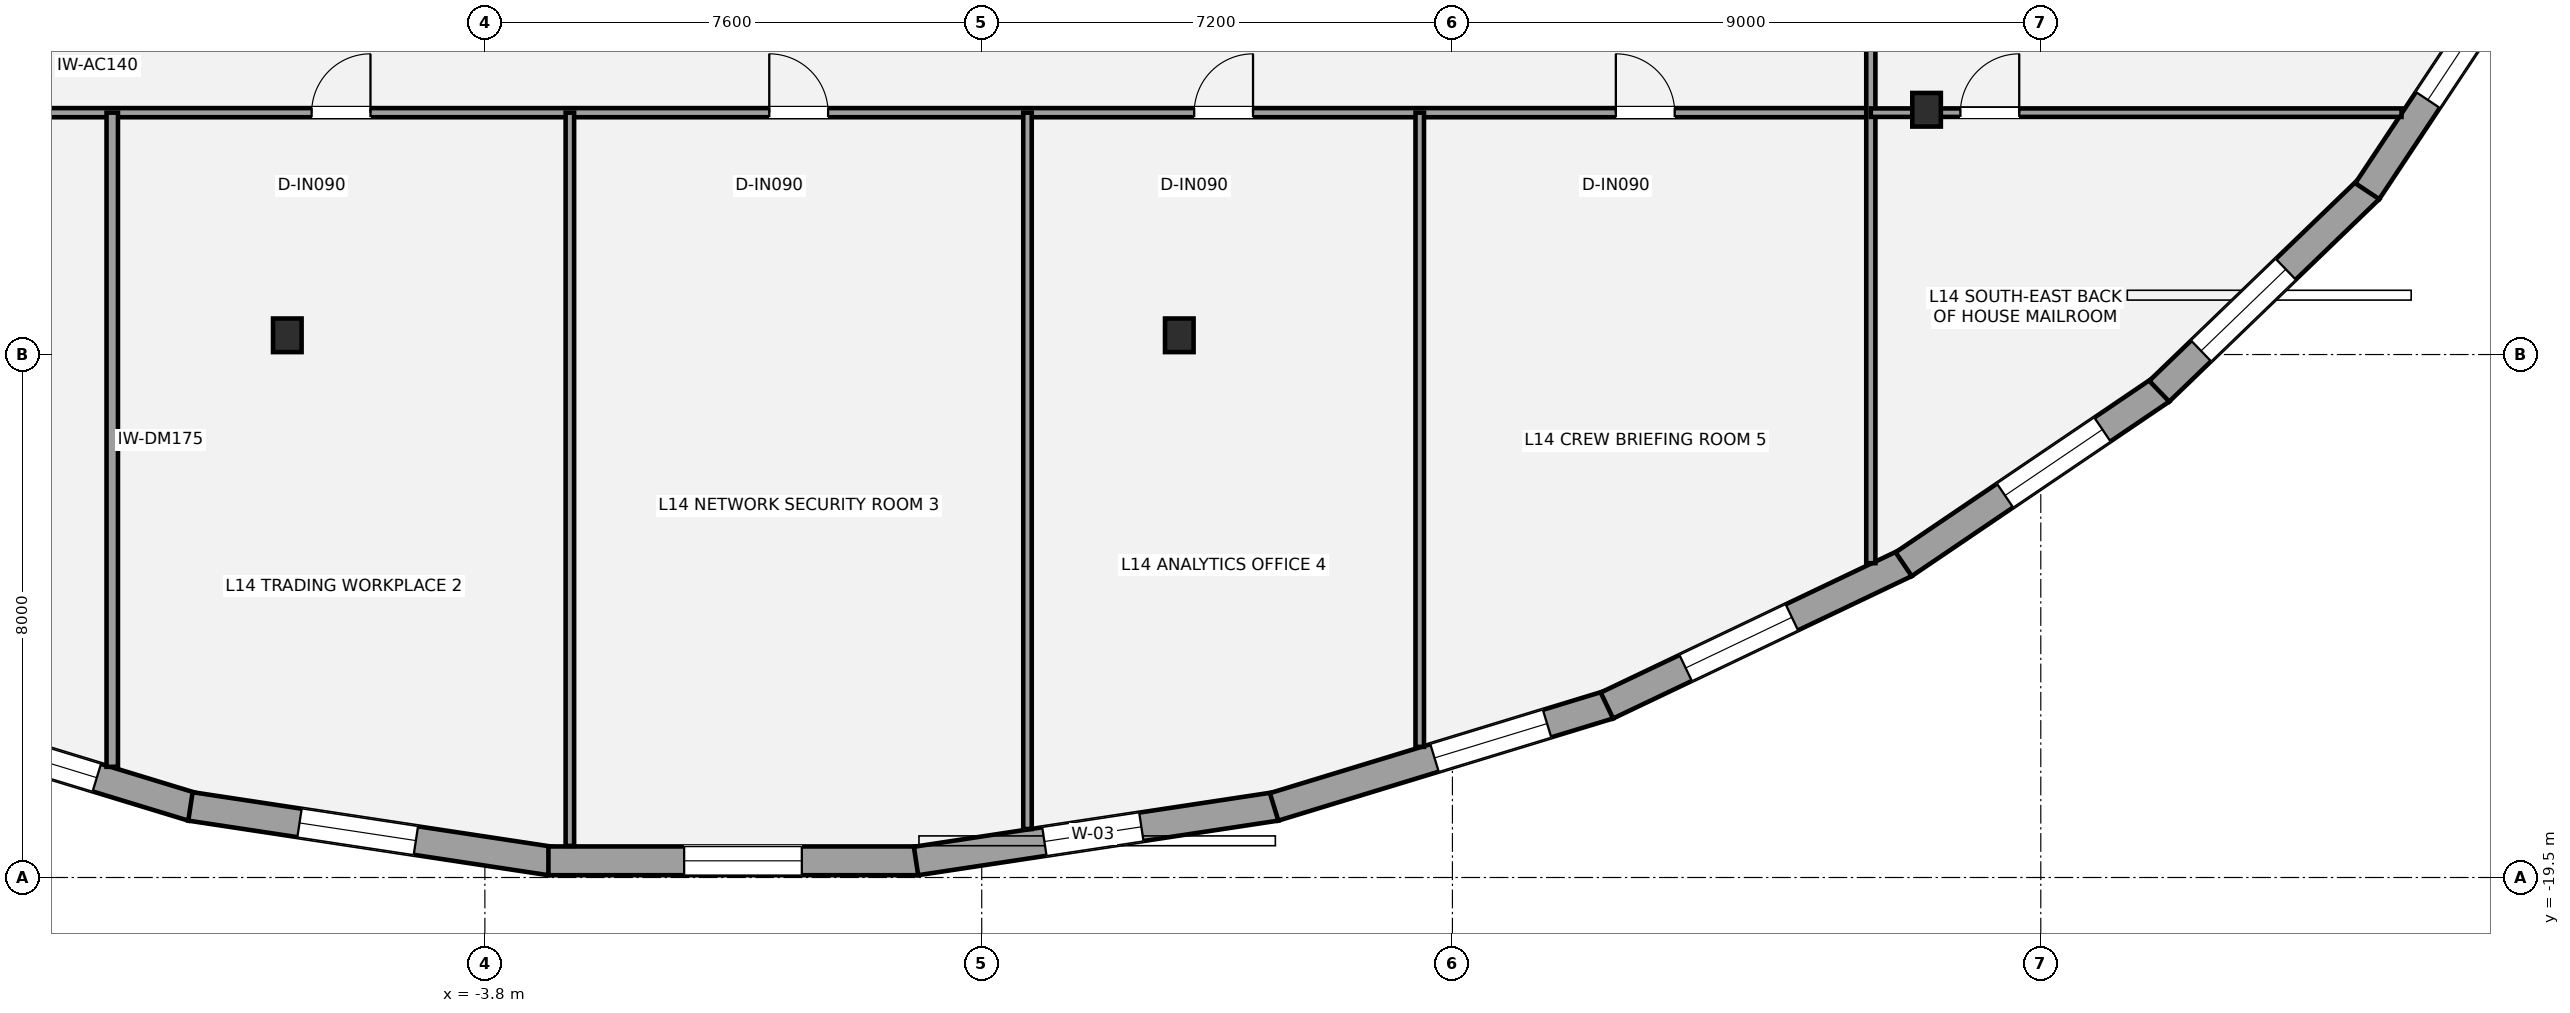
"""IFC4 building model, lengths in metres.
Left out: names, types, materials, properties, quantities, classifications, styles, units other than length and angle.
Written with IfcOpenShell. Run it as: python <this file> out.ifc"""

import sys

from ifc_helpers import new_model, si_unit, direction, frame, frame_2d, origin, origin_2d, place, context, subcontext, project, spatial, rectangle, i_section, extrude, element, fill, save


model = new_model("IFC4")
c1 = context("Model", 3, precision=1e-05, world=origin(), true_north=direction((0.0, 1.0)))
c2 = subcontext(c1, "Body", "Model", "MODEL_VIEW")
j1 = project(units=[si_unit("LENGTHUNIT", "METRE"), si_unit("PLANEANGLEUNIT", "RADIAN")], contexts=[c1])
p1 = place(None, origin())
s1 = spatial("IfcSite", under=j1, at=p1, CompositionType="ELEMENT")
p2 = place(p1, origin())
s2 = spatial("IfcBuilding", under=s1, at=p2, CompositionType="ELEMENT")
p3 = place(p2, frame((0.0, 0.0, 55.8)))
s3 = spatial("IfcBuildingStorey", under=s2, at=p3, CompositionType="ELEMENT", Elevation=55.8)
for number, where, z_axis, x_axis in (
    (1, (-6.822, -11.206, 0.0), (0.0, 0.0, 1.0), (1.0, 0.0, 0.0)),
    (2, (6.822, -11.206, 0.0), (0.0, 0.0, 1.0), (1.0, 0.0, 0.0)),
    (3, (18.253, -7.756, 0.0), (0.0, 0.0, 1.0), (1.0, 0.0, 0.0)),
):
    element("IfcColumn", number, at=place(p3, frame(where, z_axis=z_axis, x_axis=x_axis)), inside=s3, PredefinedType="COLUMN", context=c2, shape_type="SweptSolid", body=[
        extrude(i_section(OverallWidth=0.437, OverallDepth=0.514, WebThickness=0.061, FlangeThickness=0.097, at=origin_2d()), origin(), (0.0, 0.0, 1.0), 3.6),
    ])
p4 = place(p3, frame((-8.272, -18.42, 0.0), z_axis=(0.0, 0.0, 1.0), x_axis=(-0.956466543593, 0.291841996615, 0.0)))
e4 = element("IfcWall", 4, at=p4, inside=s3, PredefinedType="STANDARD", context=c2, shape_type="SweptSolid", body=[
    extrude(rectangle(XDim=5.354, YDim=0.44, at=frame_2d((2.677, 0.0))), origin(), (0.0, 0.0, 1.0), 2.529),
])
p5 = place(p4, frame((1.531, 0.0, 0.65)))
e5 = element("IfcOpeningElement", 5, at=p5, cuts=e4, PredefinedType="OPENING", context=c2, shape_type="SweptSolid", body=[
    extrude(rectangle(XDim=1.8, YDim=1.7, at=frame_2d((0.9, 0.85))), frame((0.0, 0.23, 0.0), z_axis=(0.0, -1.0, 0.0), x_axis=(1.0, 0.0, 0.0)), (0.0, 0.0, 1.0), 0.46),
])
p6 = place(p3, frame((-2.795, -19.247, 0.0), z_axis=(0.0, 0.0, 1.0), x_axis=(-0.988714127489, 0.149814465604, 0.0)))
e6 = element("IfcWall", 6, at=p6, inside=s3, PredefinedType="STANDARD", context=c2, shape_type="SweptSolid", body=[
    extrude(rectangle(XDim=5.572, YDim=0.44, at=frame_2d((2.786, 0.0))), origin(), (0.0, 0.0, 1.0), 2.529),
])
p7 = place(p6, frame((2.084, 0.0, 0.65)))
e7 = element("IfcOpeningElement", 7, at=p7, cuts=e6, PredefinedType="OPENING", context=c2, shape_type="SweptSolid", body=[
    extrude(rectangle(XDim=1.8, YDim=1.7, at=frame_2d((0.9, 0.85))), frame((0.0, 0.23, 0.0), z_axis=(0.0, -1.0, 0.0), x_axis=(1.0, 0.0, 0.0)), (0.0, 0.0, 1.0), 0.46),
])
p8 = place(p3, frame((2.828, -19.245, 0.0), z_axis=(0.0, 0.0, 1.0), x_axis=(-1.0, 0.0, 0.0)))
e8 = element("IfcWall", 8, at=p8, inside=s3, PredefinedType="STANDARD", context=c2, shape_type="SweptSolid", body=[
    extrude(rectangle(XDim=5.656, YDim=0.44, at=frame_2d((2.828, 0.0))), origin(), (0.0, 0.0, 1.0), 2.533),
])
p9 = place(p8, frame((1.78, 0.0, 0.65)))
e9 = element("IfcOpeningElement", 9, at=p9, cuts=e8, PredefinedType="OPENING", context=c2, shape_type="SweptSolid", body=[
    extrude(rectangle(XDim=1.8, YDim=1.7, at=frame_2d((0.9, 0.85))), frame((0.0, 0.23, 0.0), z_axis=(0.0, -1.0, 0.0), x_axis=(1.0, 0.0, 0.0)), (0.0, 0.0, 1.0), 0.46),
])
p10 = place(p3, frame((8.304, -18.413, 0.0), z_axis=(0.0, 0.0, 1.0), x_axis=(-0.988714127489, -0.149814465604, 0.0)))
e10 = element("IfcWall", 10, at=p10, inside=s3, PredefinedType="STANDARD", context=c2, shape_type="SweptSolid", body=[
    extrude(rectangle(XDim=5.572, YDim=0.44, at=frame_2d((2.786, 0.0))), origin(), (0.0, 0.0, 1.0), 2.529),
])
p11 = place(p10, frame((2.085, 0.0, 0.65)))
e11 = element("IfcOpeningElement", 11, at=p11, cuts=e10, PredefinedType="OPENING", context=c2, shape_type="SweptSolid", body=[
    extrude(rectangle(XDim=1.5, YDim=1.7, at=frame_2d((0.75, 0.85))), frame((0.0, 0.23, 0.0), z_axis=(0.0, -1.0, 0.0), x_axis=(1.0, 0.0, 0.0)), (0.0, 0.0, 1.0), 0.46),
])
p12 = place(p3, frame((13.393, -16.857, 0.0), z_axis=(0.0, 0.0, 1.0), x_axis=(-0.956466543593, -0.291841996615, 0.0)))
e12 = element("IfcWall", 12, at=p12, inside=s3, PredefinedType="STANDARD", context=c2, shape_type="SweptSolid", body=[
    extrude(rectangle(XDim=5.354, YDim=0.44, at=frame_2d((2.677, 0.0))), origin(), (0.0, 0.0, 1.0), 2.529),
])
p13 = place(p12, frame((0.989, 0.0, 0.65)))
e13 = element("IfcOpeningElement", 13, at=p13, cuts=e12, PredefinedType="OPENING", context=c2, shape_type="SweptSolid", body=[
    extrude(rectangle(XDim=1.8, YDim=1.7, at=frame_2d((0.9, 0.85))), frame((0.0, 0.23, 0.0), z_axis=(0.0, -1.0, 0.0), x_axis=(1.0, 0.0, 0.0)), (0.0, 0.0, 1.0), 0.46),
])
p14 = place(p3, frame((17.931, -14.691, 0.0), z_axis=(0.0, 0.0, 1.0), x_axis=(-0.902682101727, -0.430308056189, 0.0)))
e14 = element("IfcWall", 14, at=p14, inside=s3, PredefinedType="STANDARD", context=c2, shape_type="SweptSolid", body=[
    extrude(rectangle(XDim=5.061, YDim=0.44, at=frame_2d((2.53, 0.0))), origin(), (0.0, 0.0, 1.0), 2.529),
])
p15 = place(p14, frame((1.927, 0.0, 0.65)))
e15 = element("IfcOpeningElement", 15, at=p15, cuts=e14, PredefinedType="OPENING", context=c2, shape_type="SweptSolid", body=[
    extrude(rectangle(XDim=1.8, YDim=1.7, at=frame_2d((0.9, 0.85))), frame((0.0, 0.23, 0.0), z_axis=(0.0, -1.0, 0.0), x_axis=(1.0, 0.0, 0.0)), (0.0, 0.0, 1.0), 0.46),
])
p16 = place(p3, frame((21.841, -12.038, 0.0), z_axis=(0.0, 0.0, 1.0), x_axis=(-0.827723442454, -0.561136260468, 0.0)))
e16 = element("IfcWall", 16, at=p16, inside=s3, PredefinedType="STANDARD", context=c2, shape_type="SweptSolid", body=[
    extrude(rectangle(XDim=4.759, YDim=0.44, at=frame_2d((2.379, 0.0))), origin(), (0.0, 0.0, 1.0), 2.529),
])
p17 = place(p16, frame((1.086, 0.0, 0.65)))
e17 = element("IfcOpeningElement", 17, at=p17, cuts=e16, PredefinedType="OPENING", context=c2, shape_type="SweptSolid", body=[
    extrude(rectangle(XDim=1.8, YDim=1.7, at=frame_2d((0.9, 0.85))), frame((0.0, 0.23, 0.0), z_axis=(0.0, -1.0, 0.0), x_axis=(1.0, 0.0, 0.0)), (0.0, 0.0, 1.0), 0.46),
])
p18 = place(p3, frame((25.024, -8.964, 0.0), z_axis=(0.0, 0.0, 1.0), x_axis=(-0.719928259859, -0.694048485811, 0.0)))
e18 = element("IfcWall", 18, at=p18, inside=s3, PredefinedType="STANDARD", context=c2, shape_type="SweptSolid", body=[
    extrude(rectangle(XDim=4.462, YDim=0.44, at=frame_2d((2.231, 0.0))), origin(), (0.0, 0.0, 1.0), 2.529),
])
p19 = place(p18, frame((1.774, 0.0, 0.65)))
e19 = element("IfcOpeningElement", 19, at=p19, cuts=e18, PredefinedType="OPENING", context=c2, shape_type="SweptSolid", body=[
    extrude(rectangle(XDim=1.8, YDim=1.7, at=frame_2d((0.9, 0.85))), frame((0.0, 0.23, 0.0), z_axis=(0.0, -1.0, 0.0), x_axis=(1.0, 0.0, 0.0)), (0.0, 0.0, 1.0), 0.46),
])
p20 = place(p3, frame((27.299, -5.53, 0.0), z_axis=(0.0, 0.0, 1.0), x_axis=(-0.553144350008, -0.833085426625, 0.0)))
e20 = element("IfcWall", 20, at=p20, inside=s3, PredefinedType="STANDARD", context=c2, shape_type="SweptSolid", body=[
    extrude(rectangle(XDim=4.167, YDim=0.44, at=frame_2d((2.083, 0.0))), origin(), (0.0, 0.0, 1.0), 2.529),
])
p21 = place(p20, frame((0.692, 0.0, 0.65)))
e21 = element("IfcOpeningElement", 21, at=p21, cuts=e20, PredefinedType="OPENING", context=c2, shape_type="SweptSolid", body=[
    extrude(rectangle(XDim=1.8, YDim=1.7, at=frame_2d((0.9, 0.85))), frame((0.0, 0.23, 0.0), z_axis=(0.0, -1.0, 0.0), x_axis=(1.0, 0.0, 0.0)), (0.0, 0.0, 1.0), 0.46),
])
p22 = place(p3, frame((-17.4, -7.8, 0.0), z_axis=(0.0, 0.0, 1.0), x_axis=(1.0, 0.0, 0.0)))
e22 = element("IfcWall", 22, at=p22, inside=s3, PredefinedType="PARTITIONING", context=c2, shape_type="SweptSolid", body=[
    extrude(rectangle(XDim=34.8, YDim=0.14, at=frame_2d((17.4, 0.0))), origin(), (0.0, 0.0, 1.0), 2.779),
])
p23 = place(p22, frame((3.5, 0.0, 0.0)))
e23 = element("IfcOpeningElement", 23, at=p23, cuts=e22, PredefinedType="OPENING", context=c2, shape_type="SweptSolid", body=[
    extrude(rectangle(XDim=0.9, YDim=2.1, at=frame_2d((0.45, 1.05))), frame((0.0, 0.08, 0.0), z_axis=(0.0, -1.0, 0.0), x_axis=(1.0, 0.0, 0.0)), (0.0, 0.0, 1.0), 0.16),
])
p24 = place(p22, frame((10.95, 0.0, 0.0)))
e24 = element("IfcOpeningElement", 24, at=p24, cuts=e22, PredefinedType="OPENING", context=c2, shape_type="SweptSolid", body=[
    extrude(rectangle(XDim=0.9, YDim=2.1, at=frame_2d((0.45, 1.05))), frame((0.0, 0.08, 0.0), z_axis=(0.0, -1.0, 0.0), x_axis=(1.0, 0.0, 0.0)), (0.0, 0.0, 1.0), 0.16),
])
p25 = place(p22, frame((17.95, 0.0, 0.0)))
e25 = element("IfcOpeningElement", 25, at=p25, cuts=e22, PredefinedType="OPENING", context=c2, shape_type="SweptSolid", body=[
    extrude(rectangle(XDim=0.9, YDim=2.1, at=frame_2d((0.45, 1.05))), frame((0.0, 0.08, 0.0), z_axis=(0.0, -1.0, 0.0), x_axis=(1.0, 0.0, 0.0)), (0.0, 0.0, 1.0), 0.16),
])
p26 = place(p22, frame((24.45, 0.0, 0.0)))
e26 = element("IfcOpeningElement", 26, at=p26, cuts=e22, PredefinedType="OPENING", context=c2, shape_type="SweptSolid", body=[
    extrude(rectangle(XDim=0.9, YDim=2.1, at=frame_2d((0.45, 1.05))), frame((0.0, 0.08, 0.0), z_axis=(0.0, -1.0, 0.0), x_axis=(1.0, 0.0, 0.0)), (0.0, 0.0, 1.0), 0.16),
])
p27 = place(p22, frame((30.9, 0.0, 0.0)))
e27 = element("IfcOpeningElement", 27, at=p27, cuts=e22, PredefinedType="OPENING", context=c2, shape_type="SweptSolid", body=[
    extrude(rectangle(XDim=0.9, YDim=2.1, at=frame_2d((0.45, 1.05))), frame((0.0, 0.08, 0.0), z_axis=(0.0, -1.0, 0.0), x_axis=(1.0, 0.0, 0.0)), (0.0, 0.0, 1.0), 0.16),
])
p28 = place(p3, frame((17.4, -14.692, 0.0), z_axis=(0.0, 0.0, 1.0), x_axis=(0.0, 1.0, 0.0)))
e28 = element("IfcWall", 28, at=p28, inside=s3, PredefinedType="PARTITIONING", context=c2, shape_type="SweptSolid", body=[
    extrude(rectangle(XDim=20.542, YDim=0.14, at=frame_2d((10.271, 0.0))), origin(), (0.0, 0.0, 1.0), 2.841),
])
p29 = place(p28, frame((11.591, 0.0, 0.0)))
e29 = element("IfcOpeningElement", 29, at=p29, cuts=e28, PredefinedType="OPENING", context=c2, shape_type="SweptSolid", body=[
    extrude(rectangle(XDim=0.9, YDim=2.1, at=frame_2d((0.45, 1.05))), frame((0.0, 0.08, 0.0), z_axis=(0.0, -1.0, 0.0), x_axis=(1.0, 0.0, 0.0)), (0.0, 0.0, 1.0), 0.16),
])
p30 = place(p28, frame((18.417, 0.0, 0.0)))
e30 = element("IfcOpeningElement", 30, at=p30, cuts=e28, PredefinedType="OPENING", context=c2, shape_type="SweptSolid", body=[
    extrude(rectangle(XDim=0.9, YDim=2.1, at=frame_2d((0.45, 1.05))), frame((0.0, 0.08, 0.0), z_axis=(0.0, -1.0, 0.0), x_axis=(1.0, 0.0, 0.0)), (0.0, 0.0, 1.0), 0.16),
])
p31 = place(p3, frame((-9.5, -17.807, 0.0), z_axis=(0.0, 0.0, 1.0), x_axis=(0.0, 1.0, 0.0)))
e31 = element("IfcWall", 31, at=p31, inside=s3, PredefinedType="PARTITIONING", context=c2, shape_type="SweptSolid", body=[
    extrude(rectangle(XDim=10.007, YDim=0.175, at=frame_2d((5.003, 0.0))), origin(), (0.0, 0.0, 1.0), 2.853),
])
p32 = place(p3, frame((-2.5, -19.017, 0.0), z_axis=(0.0, 0.0, 1.0), x_axis=(0.0, 1.0, 0.0)))
e32 = element("IfcWall", 32, at=p32, inside=s3, PredefinedType="PARTITIONING", context=c2, shape_type="SweptSolid", body=[
    extrude(rectangle(XDim=11.217, YDim=0.13, at=frame_2d((5.608, 0.0))), origin(), (0.0, 0.0, 1.0), 2.853),
])
p33 = place(p3, frame((4.5, -18.758, 0.0), z_axis=(0.0, 0.0, 1.0), x_axis=(0.0, 1.0, 0.0)))
e33 = element("IfcWall", 33, at=p33, inside=s3, PredefinedType="PARTITIONING", context=c2, shape_type="SweptSolid", body=[
    extrude(rectangle(XDim=10.958, YDim=0.13, at=frame_2d((5.479, 0.0))), origin(), (0.0, 0.0, 1.0), 2.853),
])
p34 = place(p3, frame((10.5, -17.502, 0.0), z_axis=(0.0, 0.0, 1.0), x_axis=(0.0, 1.0, 0.0)))
e34 = element("IfcWall", 34, at=p34, inside=s3, PredefinedType="PARTITIONING", context=c2, shape_type="SweptSolid", body=[
    extrude(rectangle(XDim=9.702, YDim=0.13, at=frame_2d((4.851, 0.0))), origin(), (0.0, 0.0, 1.0), 3.4),
])
p35 = place(p3, frame((17.4, -7.8, 0.0), z_axis=(0.0, 0.0, 1.0), x_axis=(1.0, 0.0, 0.0)))
e35 = element("IfcWall", 35, at=p35, inside=s3, PredefinedType="PARTITIONING", context=c2, shape_type="SweptSolid", body=[
    extrude(rectangle(XDim=8.118, YDim=0.13, at=frame_2d((4.059, 0.0))), origin(), (0.0, 0.0, 1.0), 2.779),
])
p36 = place(p35, frame((1.37, 0.0, 0.0)))
e36 = element("IfcOpeningElement", 36, at=p36, cuts=e35, PredefinedType="OPENING", context=c2, shape_type="SweptSolid", body=[
    extrude(rectangle(XDim=0.9, YDim=2.1, at=frame_2d((0.45, 1.05))), frame((0.0, 0.075, 0.0), z_axis=(0.0, -1.0, 0.0), x_axis=(1.0, 0.0, 0.0)), (0.0, 0.0, 1.0), 0.15),
])
p37 = place(p5, origin())
e37 = element("IfcWindow", 37, at=p37, inside=s3, PartitioningType="SINGLE_PANEL", PredefinedType="WINDOW", context=c2, shape_type="SweptSolid", body=[
    extrude(rectangle(XDim=1.8, YDim=1.7, at=frame_2d((0.9, 0.85))), frame((0.0, -0.01, 0.0), z_axis=(0.0, -1.0, 0.0), x_axis=(1.0, 0.0, 0.0)), (0.0, 0.0, 1.0), 0.06),
])
fill(e5, e37)
p38 = place(p7, origin())
e38 = element("IfcWindow", 38, at=p38, inside=s3, PartitioningType="SINGLE_PANEL", PredefinedType="WINDOW", context=c2, shape_type="SweptSolid", body=[
    extrude(rectangle(XDim=1.8, YDim=1.7, at=frame_2d((0.9, 0.85))), frame((0.0, -0.01, 0.0), z_axis=(0.0, -1.0, 0.0), x_axis=(1.0, 0.0, 0.0)), (0.0, 0.0, 1.0), 0.06),
])
fill(e7, e38)
p39 = place(p9, origin())
e39 = element("IfcWindow", 39, at=p39, inside=s3, PartitioningType="SINGLE_PANEL", PredefinedType="WINDOW", context=c2, shape_type="SweptSolid", body=[
    extrude(rectangle(XDim=1.8, YDim=1.7, at=frame_2d((0.9, 0.85))), frame((0.0, -0.01, 0.0), z_axis=(0.0, -1.0, 0.0), x_axis=(1.0, 0.0, 0.0)), (0.0, 0.0, 1.0), 0.06),
])
fill(e9, e39)
p40 = place(p11, origin())
e40 = element("IfcWindow", 40, at=p40, inside=s3, PartitioningType="SINGLE_PANEL", PredefinedType="WINDOW", context=c2, shape_type="SweptSolid", body=[
    extrude(rectangle(XDim=1.5, YDim=1.7, at=frame_2d((0.75, 0.85))), frame((0.0, -0.01, 0.0), z_axis=(0.0, -1.0, 0.0), x_axis=(1.0, 0.0, 0.0)), (0.0, 0.0, 1.0), 0.06),
])
fill(e11, e40)
p41 = place(p13, origin())
e41 = element("IfcWindow", 41, at=p41, inside=s3, PartitioningType="SINGLE_PANEL", PredefinedType="WINDOW", context=c2, shape_type="SweptSolid", body=[
    extrude(rectangle(XDim=1.8, YDim=1.7, at=frame_2d((0.9, 0.85))), frame((0.0, -0.01, 0.0), z_axis=(0.0, -1.0, 0.0), x_axis=(1.0, 0.0, 0.0)), (0.0, 0.0, 1.0), 0.06),
])
fill(e13, e41)
p42 = place(p15, origin())
e42 = element("IfcWindow", 42, at=p42, inside=s3, PartitioningType="SINGLE_PANEL", PredefinedType="WINDOW", context=c2, shape_type="SweptSolid", body=[
    extrude(rectangle(XDim=1.8, YDim=1.7, at=frame_2d((0.9, 0.85))), frame((0.0, -0.01, 0.0), z_axis=(0.0, -1.0, 0.0), x_axis=(1.0, 0.0, 0.0)), (0.0, 0.0, 1.0), 0.06),
])
fill(e15, e42)
p43 = place(p17, origin())
e43 = element("IfcWindow", 43, at=p43, inside=s3, PartitioningType="SINGLE_PANEL", PredefinedType="WINDOW", context=c2, shape_type="SweptSolid", body=[
    extrude(rectangle(XDim=1.8, YDim=1.7, at=frame_2d((0.9, 0.85))), frame((0.0, -0.01, 0.0), z_axis=(0.0, -1.0, 0.0), x_axis=(1.0, 0.0, 0.0)), (0.0, 0.0, 1.0), 0.06),
])
fill(e17, e43)
p44 = place(p19, origin())
e44 = element("IfcWindow", 44, at=p44, inside=s3, PartitioningType="SINGLE_PANEL", PredefinedType="WINDOW", context=c2, shape_type="SweptSolid", body=[
    extrude(rectangle(XDim=1.8, YDim=1.7, at=frame_2d((0.9, 0.85))), frame((0.0, -0.01, 0.0), z_axis=(0.0, -1.0, 0.0), x_axis=(1.0, 0.0, 0.0)), (0.0, 0.0, 1.0), 0.06),
])
fill(e19, e44)
p45 = place(p21, origin())
e45 = element("IfcWindow", 45, at=p45, inside=s3, PartitioningType="SINGLE_PANEL", PredefinedType="WINDOW", context=c2, shape_type="SweptSolid", body=[
    extrude(rectangle(XDim=1.8, YDim=1.7, at=frame_2d((0.9, 0.85))), frame((0.0, -0.01, 0.0), z_axis=(0.0, -1.0, 0.0), x_axis=(1.0, 0.0, 0.0)), (0.0, 0.0, 1.0), 0.06),
])
fill(e21, e45)
p46 = place(p24, origin())
e46 = element("IfcDoor", 46, at=p46, inside=s3, OperationType="SINGLE_SWING_RIGHT", PredefinedType="DOOR", context=c2, shape_type="SweptSolid", body=[
    extrude(rectangle(XDim=0.9, YDim=2.1, at=frame_2d((0.45, 1.05))), frame((0.0, 0.025, 0.0), z_axis=(0.0, -1.0, 0.0), x_axis=(1.0, 0.0, 0.0)), (0.0, 0.0, 1.0), 0.05),
])
fill(e24, e46)
p47 = place(p25, origin())
e47 = element("IfcDoor", 47, at=p47, inside=s3, OperationType="SINGLE_SWING_LEFT", PredefinedType="DOOR", context=c2, shape_type="SweptSolid", body=[
    extrude(rectangle(XDim=0.9, YDim=2.1, at=frame_2d((0.45, 1.05))), frame((0.0, 0.025, 0.0), z_axis=(0.0, -1.0, 0.0), x_axis=(1.0, 0.0, 0.0)), (0.0, 0.0, 1.0), 0.05),
])
fill(e25, e47)
p48 = place(p26, origin())
e48 = element("IfcDoor", 48, at=p48, inside=s3, OperationType="SINGLE_SWING_RIGHT", PredefinedType="DOOR", context=c2, shape_type="SweptSolid", body=[
    extrude(rectangle(XDim=0.9, YDim=2.1, at=frame_2d((0.45, 1.05))), frame((0.0, 0.025, 0.0), z_axis=(0.0, -1.0, 0.0), x_axis=(1.0, 0.0, 0.0)), (0.0, 0.0, 1.0), 0.05),
])
fill(e26, e48)
p49 = place(p27, origin())
e49 = element("IfcDoor", 49, at=p49, inside=s3, OperationType="SINGLE_SWING_LEFT", PredefinedType="DOOR", context=c2, shape_type="SweptSolid", body=[
    extrude(rectangle(XDim=0.9, YDim=2.1, at=frame_2d((0.45, 1.05))), frame((0.0, 0.025, 0.0), z_axis=(0.0, -1.0, 0.0), x_axis=(1.0, 0.0, 0.0)), (0.0, 0.0, 1.0), 0.05),
])
fill(e27, e49)
p50 = place(p36, origin())
e50 = element("IfcDoor", 50, at=p50, inside=s3, OperationType="SINGLE_SWING_RIGHT", PredefinedType="DOOR", context=c2, shape_type="SweptSolid", body=[
    extrude(rectangle(XDim=0.9, YDim=2.1, at=frame_2d((0.45, 1.05))), frame((0.0, 0.025, 0.0), z_axis=(0.0, -1.0, 0.0), x_axis=(1.0, 0.0, 0.0)), (0.0, 0.0, 1.0), 0.05),
])
fill(e36, e50)
save(model, sys.argv[1])
